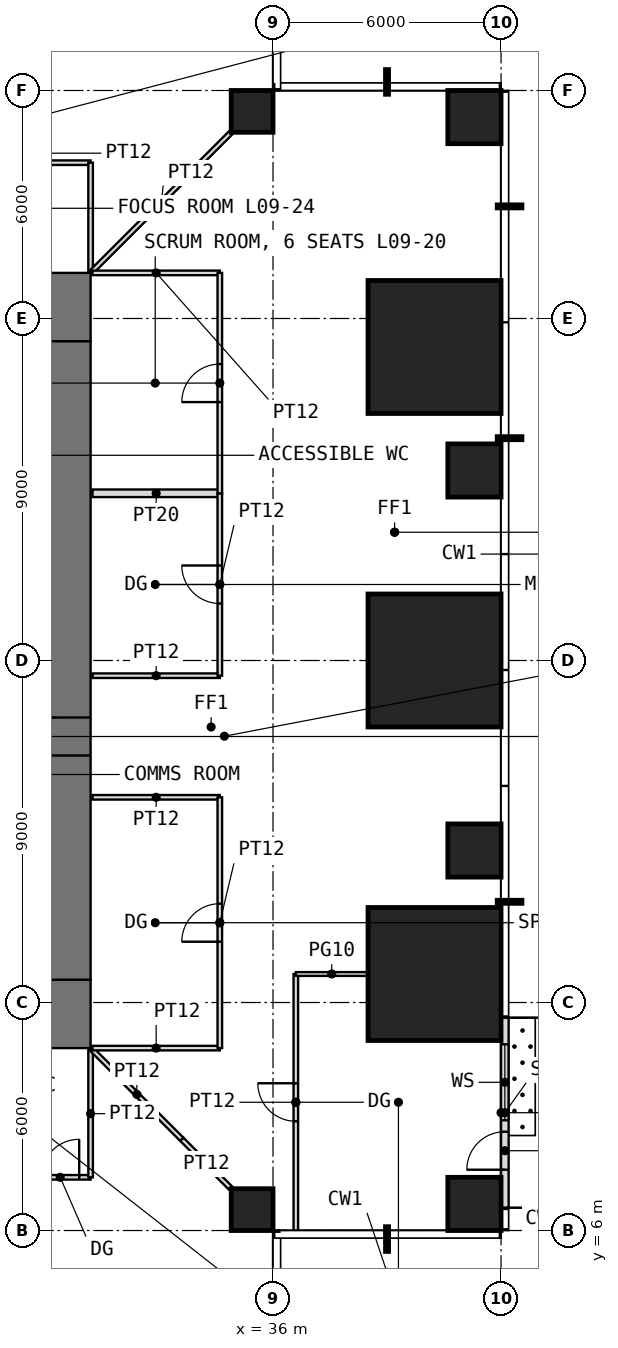
"""IFC4 building model, lengths in metres.
Left out: names, types, materials, properties, quantities, classifications, styles, units other than length and angle.
Written with IfcOpenShell. Run it as: python <this file> out.ifc"""

import sys

from ifc_helpers import new_model, si_unit, direction, frame, frame_2d, origin, origin_2d, place, context, subcontext, project, spatial, rectangle, extrude, element, fill, save


model = new_model("IFC4")
c1 = context("Model", 3, precision=1e-05, world=origin(), true_north=direction((0.0, 1.0)))
c2 = subcontext(c1, "Body", "Model", "MODEL_VIEW")
j1 = project(units=[si_unit("LENGTHUNIT", "METRE"), si_unit("PLANEANGLEUNIT", "RADIAN")], contexts=[c1])
p1 = place(None, origin())
s1 = spatial("IfcSite", under=j1, at=p1, CompositionType="ELEMENT")
p2 = place(p1, origin())
s2 = spatial("IfcBuilding", under=s1, at=p2, CompositionType="ELEMENT")
p3 = place(p2, frame((0.0, 0.0, 42.5)))
s3 = spatial("IfcBuildingStorey", under=s2, at=p3, CompositionType="ELEMENT", Elevation=42.5)
p4 = place(p3, frame((35.45, 6.55, 0.0), z_axis=(0.0, 0.0, 1.0), x_axis=(1.0, 0.0, 0.0)))
e1 = element("IfcColumn", 1, at=p4, inside=s3, PredefinedType="COLUMN", context=c2, shape_type="SweptSolid", body=[
    extrude(rectangle(XDim=1.1, YDim=1.1, at=origin_2d()), origin(), (0.0, 0.0, 1.0), 4.0),
])
p5 = place(p3, frame((41.3, 6.7, 0.0), z_axis=(0.0, 0.0, 1.0), x_axis=(1.0, 0.0, 0.0)))
e2 = element("IfcColumn", 2, at=p5, inside=s3, PredefinedType="COLUMN", context=c2, shape_type="SweptSolid", body=[
    extrude(rectangle(XDim=1.4, YDim=1.4, at=origin_2d()), origin(), (0.0, 0.0, 1.0), 4.0),
])
p6 = place(p3, frame((40.25, 12.75, 0.0), z_axis=(0.0, 0.0, 1.0), x_axis=(1.0, 0.0, 0.0)))
e3 = element("IfcColumn", 3, at=p6, inside=s3, PredefinedType="COLUMN", context=c2, shape_type="SweptSolid", body=[
    extrude(rectangle(XDim=3.5, YDim=3.5, at=origin_2d()), origin(), (0.0, 0.0, 1.0), 4.0),
])
p7 = place(p3, frame((41.3, 16.0, 0.0), z_axis=(0.0, 0.0, 1.0), x_axis=(1.0, 0.0, 0.0)))
e4 = element("IfcColumn", 4, at=p7, inside=s3, PredefinedType="COLUMN", context=c2, shape_type="SweptSolid", body=[
    extrude(rectangle(XDim=1.4, YDim=1.4, at=origin_2d()), origin(), (0.0, 0.0, 1.0), 4.0),
])
p8 = place(p3, frame((40.25, 21.0, 0.0), z_axis=(0.0, 0.0, 1.0), x_axis=(1.0, 0.0, 0.0)))
e5 = element("IfcColumn", 5, at=p8, inside=s3, PredefinedType="COLUMN", context=c2, shape_type="SweptSolid", body=[
    extrude(rectangle(XDim=3.5, YDim=3.5, at=origin_2d()), origin(), (0.0, 0.0, 1.0), 4.0),
])
p9 = place(p3, frame((41.3, 26.0, 0.0), z_axis=(0.0, 0.0, 1.0), x_axis=(1.0, 0.0, 0.0)))
e6 = element("IfcColumn", 6, at=p9, inside=s3, PredefinedType="COLUMN", context=c2, shape_type="SweptSolid", body=[
    extrude(rectangle(XDim=1.4, YDim=1.4, at=origin_2d()), origin(), (0.0, 0.0, 1.0), 4.0),
])
p10 = place(p3, frame((40.25, 29.25, 0.0), z_axis=(0.0, 0.0, 1.0), x_axis=(1.0, 0.0, 0.0)))
e7 = element("IfcColumn", 7, at=p10, inside=s3, PredefinedType="COLUMN", context=c2, shape_type="SweptSolid", body=[
    extrude(rectangle(XDim=3.5, YDim=3.5, at=origin_2d()), origin(), (0.0, 0.0, 1.0), 4.0),
])
p11 = place(p3, frame((35.45, 35.45, 0.0), z_axis=(0.0, 0.0, 1.0), x_axis=(1.0, 0.0, 0.0)))
e8 = element("IfcColumn", 8, at=p11, inside=s3, PredefinedType="COLUMN", context=c2, shape_type="SweptSolid", body=[
    extrude(rectangle(XDim=1.1, YDim=1.1, at=origin_2d()), origin(), (0.0, 0.0, 1.0), 4.0),
])
p12 = place(p3, frame((41.3, 35.3, 0.0), z_axis=(0.0, 0.0, 1.0), x_axis=(1.0, 0.0, 0.0)))
e9 = element("IfcColumn", 9, at=p12, inside=s3, PredefinedType="COLUMN", context=c2, shape_type="SweptSolid", body=[
    extrude(rectangle(XDim=1.4, YDim=1.4, at=origin_2d()), origin(), (0.0, 0.0, 1.0), 4.0),
])
p13 = place(p3, frame((42.1, 6.6, 0.0), z_axis=(0.0, 0.0, 1.0), x_axis=(0.0, 1.0, 0.0)))
e10 = element("IfcWall", 10, at=p13, inside=s3, PredefinedType="USERDEFINED", context=c2, shape_type="SweptSolid", body=[
    extrude(rectangle(XDim=5.0, YDim=0.2, at=frame_2d((2.5, 0.0))), origin(), (0.0, 0.0, 1.0), 3.75),
])
p14 = place(p13, frame((1.0, 0.0, 0.0)))
e11 = element("IfcOpeningElement", 11, at=p14, cuts=e10, PredefinedType="OPENING", context=c2, shape_type="SweptSolid", body=[
    extrude(rectangle(XDim=1.0, YDim=2.4, at=frame_2d((0.5, 1.2))), frame((0.0, 0.11, 0.0), z_axis=(0.0, -1.0, 0.0), x_axis=(1.0, 0.0, 0.0)), (0.0, 0.0, 1.0), 0.22),
])
p15 = place(p13, frame((2.3, 0.0, 0.3)))
e12 = element("IfcOpeningElement", 12, at=p15, cuts=e10, PredefinedType="OPENING", context=c2, shape_type="SweptSolid", body=[
    extrude(rectangle(XDim=2.0, YDim=2.7, at=frame_2d((1.0, 1.35))), frame((0.0, 0.11, 0.0), z_axis=(0.0, -1.0, 0.0), x_axis=(1.0, 0.0, 0.0)), (0.0, 0.0, 1.0), 0.22),
])
p16 = place(p3, frame((10.8, 11.7, -0.05), z_axis=(0.0, 0.0, 1.0), x_axis=(1.0, 0.0, 0.0)))
e13 = element("IfcWall", 13, at=p16, inside=s3, PredefinedType="SHEAR", context=c2, shape_type="SweptSolid", body=[
    extrude(rectangle(XDim=20.4, YDim=1.8, at=frame_2d((10.2, 0.0))), origin(), (0.0, 0.0, 1.0), 4.0),
])
p17 = place(p16, frame((9.2, 0.0, 0.05)))
e14 = element("IfcOpeningElement", 14, at=p17, cuts=e13, PredefinedType="OPENING", context=c2, shape_type="SweptSolid", body=[
    extrude(rectangle(XDim=2.0, YDim=2.2, at=frame_2d((1.0, 1.1))), frame((0.0, 0.91, 0.0), z_axis=(0.0, -1.0, 0.0), x_axis=(1.0, 0.0, 0.0)), (0.0, 0.0, 1.0), 1.82),
])
p18 = place(p3, frame((10.8, 30.3, -0.05), z_axis=(0.0, 0.0, 1.0), x_axis=(1.0, 0.0, 0.0)))
e15 = element("IfcWall", 15, at=p18, inside=s3, PredefinedType="SHEAR", context=c2, shape_type="SweptSolid", body=[
    extrude(rectangle(XDim=20.4, YDim=1.8, at=frame_2d((10.2, 0.0))), origin(), (0.0, 0.0, 1.0), 4.0),
])
p19 = place(p18, frame((9.2, 0.0, 0.05)))
e16 = element("IfcOpeningElement", 16, at=p19, cuts=e15, PredefinedType="OPENING", context=c2, shape_type="SweptSolid", body=[
    extrude(rectangle(XDim=2.0, YDim=2.2, at=frame_2d((1.0, 1.1))), frame((0.0, 0.91, 0.0), z_axis=(0.0, -1.0, 0.0), x_axis=(1.0, 0.0, 0.0)), (0.0, 0.0, 1.0), 1.82),
])
p20 = place(p3, frame((30.3, 12.6, -0.05), z_axis=(0.0, 0.0, 1.0), x_axis=(0.0, 1.0, 0.0)))
e17 = element("IfcWall", 17, at=p20, inside=s3, PredefinedType="SHEAR", context=c2, shape_type="SweptSolid", body=[
    extrude(rectangle(XDim=16.8, YDim=1.8, at=frame_2d((8.4, 0.0))), origin(), (0.0, 0.0, 1.0), 4.0),
])
p21 = place(p20, frame((5.9, 0.0, 0.05)))
e18 = element("IfcOpeningElement", 18, at=p21, cuts=e17, PredefinedType="OPENING", context=c2, shape_type="SweptSolid", body=[
    extrude(rectangle(XDim=1.0, YDim=2.2, at=frame_2d((0.5, 1.1))), frame((0.0, 0.91, 0.0), z_axis=(0.0, -1.0, 0.0), x_axis=(1.0, 0.0, 0.0)), (0.0, 0.0, 1.0), 1.82),
])
p22 = place(p3, frame((27.0, 34.1, 0.0), z_axis=(0.0, 0.0, 1.0), x_axis=(1.0, 0.0, 0.0)))
e19 = element("IfcWall", 19, at=p22, inside=s3, PredefinedType="PARTITIONING", context=c2, shape_type="SweptSolid", body=[
    extrude(rectangle(XDim=4.2, YDim=0.12, at=frame_2d((2.1, 0.0))), origin(), (0.0, 0.0, 1.0), 3.75),
])
p23 = place(p22, frame((1.6, 0.0, 0.0)))
e20 = element("IfcOpeningElement", 20, at=p23, cuts=e19, PredefinedType="OPENING", context=c2, shape_type="SweptSolid", body=[
    extrude(rectangle(XDim=1.0, YDim=2.2, at=frame_2d((0.5, 1.1))), frame((0.0, 0.07, 0.0), z_axis=(0.0, -1.0, 0.0), x_axis=(1.0, 0.0, 0.0)), (0.0, 0.0, 1.0), 0.14),
])
p24 = place(p3, frame((27.4, 7.4, 0.0), z_axis=(0.0, 0.0, 1.0), x_axis=(1.0, 0.0, 0.0)))
e21 = element("IfcWall", 21, at=p24, inside=s3, PredefinedType="PARTITIONING", context=c2, shape_type="SweptSolid", body=[
    extrude(rectangle(XDim=3.8, YDim=0.12, at=frame_2d((1.9, 0.0))), origin(), (0.0, 0.0, 1.0), 3.75),
])
p25 = place(p24, frame((2.5, 0.0, 0.0)))
e22 = element("IfcOpeningElement", 22, at=p25, cuts=e21, PredefinedType="OPENING", context=c2, shape_type="SweptSolid", body=[
    extrude(rectangle(XDim=1.0, YDim=2.4, at=frame_2d((0.5, 1.2))), frame((0.0, 0.07, 0.0), z_axis=(0.0, -1.0, 0.0), x_axis=(1.0, 0.0, 0.0)), (0.0, 0.0, 1.0), 0.14),
])
p26 = place(p3, frame((31.2, 7.4, 0.0), z_axis=(0.0, 0.0, 1.0), x_axis=(0.0, 1.0, 0.0)))
e23 = element("IfcWall", 23, at=p26, inside=s3, PredefinedType="PARTITIONING", context=c2, shape_type="SweptSolid", body=[
    extrude(rectangle(XDim=3.35, YDim=0.12, at=frame_2d((1.675, 0.0))), origin(), (0.0, 0.0, 1.0), 3.75),
])
p27 = place(p3, frame((31.2, 31.25, 0.0), z_axis=(0.0, 0.0, 1.0), x_axis=(0.0, 1.0, 0.0)))
e24 = element("IfcWall", 24, at=p27, inside=s3, PredefinedType="PARTITIONING", context=c2, shape_type="SweptSolid", body=[
    extrude(rectangle(XDim=2.85, YDim=0.12, at=frame_2d((1.425, 0.0))), origin(), (0.0, 0.0, 1.0), 3.75),
])
p28 = place(p3, frame((31.235, 10.765, 0.0), z_axis=(0.0, 0.0, 1.0), x_axis=(0.707106781187, -0.707106781187, 0.0)))
e25 = element("IfcWall", 25, at=p28, inside=s3, PredefinedType="PARTITIONING", context=c2, shape_type="SweptSolid", body=[
    extrude(rectangle(XDim=3.346, YDim=0.12, at=frame_2d((1.673, 0.0))), origin(), (0.0, 0.0, 1.0), 3.75),
])
p29 = place(p3, frame((31.235, 31.235, 0.0), z_axis=(0.0, 0.0, 1.0), x_axis=(0.707106781187, 0.707106781187, 0.0)))
e26 = element("IfcWall", 26, at=p29, inside=s3, PredefinedType="PARTITIONING", context=c2, shape_type="SweptSolid", body=[
    extrude(rectangle(XDim=5.168, YDim=0.12, at=frame_2d((2.584, 0.0))), origin(), (0.0, 0.0, 1.0), 3.75),
])
for number, where, z_axis, x_axis in (
    (27, (31.25, 10.8, 0.0), (0.0, 0.0, 1.0), (1.0, 0.0, 0.0)),
    (28, (31.25, 17.4, 0.0), (0.0, 0.0, 1.0), (1.0, 0.0, 0.0)),
    (29, (31.25, 20.6, 0.0), (0.0, 0.0, 1.0), (1.0, 0.0, 0.0)),
):
    element("IfcWall", number, at=place(p3, frame(where, z_axis=z_axis, x_axis=x_axis)), inside=s3, PredefinedType="PARTITIONING", context=c2, shape_type="SweptSolid", body=[
        extrude(rectangle(XDim=3.35, YDim=0.12, at=frame_2d((1.675, 0.0))), origin(), (0.0, 0.0, 1.0), 3.75),
    ])
p30 = place(p3, frame((31.25, 25.4, 0.0), z_axis=(0.0, 0.0, 1.0), x_axis=(1.0, 0.0, 0.0)))
e30 = element("IfcWall", 30, at=p30, inside=s3, PredefinedType="PARTITIONING", context=c2, shape_type="SweptSolid", body=[
    extrude(rectangle(XDim=3.35, YDim=0.2, at=frame_2d((1.675, 0.0))), origin(), (0.0, 0.0, 1.0), 3.75),
])
p31 = place(p3, frame((31.25, 31.2, 0.0), z_axis=(0.0, 0.0, 1.0), x_axis=(1.0, 0.0, 0.0)))
e31 = element("IfcWall", 31, at=p31, inside=s3, PredefinedType="PARTITIONING", context=c2, shape_type="SweptSolid", body=[
    extrude(rectangle(XDim=3.35, YDim=0.12, at=frame_2d((1.675, 0.0))), origin(), (0.0, 0.0, 1.0), 3.75),
])
p32 = place(p3, frame((33.602, 8.398, 0.0), z_axis=(0.0, 0.0, 1.0), x_axis=(0.707106781187, -0.707106781187, 0.0)))
e32 = element("IfcWall", 32, at=p32, inside=s3, PredefinedType="PARTITIONING", context=c2, shape_type="SweptSolid", body=[
    extrude(rectangle(XDim=1.822, YDim=0.12, at=frame_2d((0.911, 0.0))), origin(), (0.0, 0.0, 1.0), 3.75),
])
p33 = place(p3, frame((34.6, 10.8, 0.0), z_axis=(0.0, 0.0, 1.0), x_axis=(0.0, 1.0, 0.0)))
e33 = element("IfcWall", 33, at=p33, inside=s3, PredefinedType="PARTITIONING", context=c2, shape_type="SweptSolid", body=[
    extrude(rectangle(XDim=6.6, YDim=0.12, at=frame_2d((3.3, 0.0))), origin(), (0.0, 0.0, 1.0), 3.75),
])
p34 = place(p33, frame((2.8, 0.0, 0.0)))
e34 = element("IfcOpeningElement", 34, at=p34, cuts=e33, PredefinedType="OPENING", context=c2, shape_type="SweptSolid", body=[
    extrude(rectangle(XDim=1.0, YDim=2.4, at=frame_2d((0.5, 1.2))), frame((0.0, 0.07, 0.0), z_axis=(0.0, -1.0, 0.0), x_axis=(1.0, 0.0, 0.0)), (0.0, 0.0, 1.0), 0.14),
])
p35 = place(p3, frame((34.6, 20.6, 0.0), z_axis=(0.0, 0.0, 1.0), x_axis=(0.0, 1.0, 0.0)))
e35 = element("IfcWall", 35, at=p35, inside=s3, PredefinedType="PARTITIONING", context=c2, shape_type="SweptSolid", body=[
    extrude(rectangle(XDim=4.8, YDim=0.12, at=frame_2d((2.4, 0.0))), origin(), (0.0, 0.0, 1.0), 3.75),
])
p36 = place(p35, frame((1.9, 0.0, 0.0)))
e36 = element("IfcOpeningElement", 36, at=p36, cuts=e35, PredefinedType="OPENING", context=c2, shape_type="SweptSolid", body=[
    extrude(rectangle(XDim=1.0, YDim=2.4, at=frame_2d((0.5, 1.2))), frame((0.0, 0.07, 0.0), z_axis=(0.0, -1.0, 0.0), x_axis=(1.0, 0.0, 0.0)), (0.0, 0.0, 1.0), 0.14),
])
p37 = place(p3, frame((34.6, 25.4, 0.0), z_axis=(0.0, 0.0, 1.0), x_axis=(0.0, 1.0, 0.0)))
e37 = element("IfcWall", 37, at=p37, inside=s3, PredefinedType="PARTITIONING", context=c2, shape_type="SweptSolid", body=[
    extrude(rectangle(XDim=5.8, YDim=0.12, at=frame_2d((2.9, 0.0))), origin(), (0.0, 0.0, 1.0), 3.75),
])
p38 = place(p37, frame((2.4, 0.0, 0.0)))
e38 = element("IfcOpeningElement", 38, at=p38, cuts=e37, PredefinedType="OPENING", context=c2, shape_type="SweptSolid", body=[
    extrude(rectangle(XDim=1.0, YDim=2.4, at=frame_2d((0.5, 1.2))), frame((0.0, 0.07, 0.0), z_axis=(0.0, -1.0, 0.0), x_axis=(1.0, 0.0, 0.0)), (0.0, 0.0, 1.0), 0.14),
])
p39 = place(p3, frame((36.6, 6.0, 0.0), z_axis=(0.0, 0.0, 1.0), x_axis=(0.0, 1.0, 0.0)))
e39 = element("IfcWall", 39, at=p39, inside=s3, PredefinedType="PARTITIONING", context=c2, shape_type="SweptSolid", body=[
    extrude(rectangle(XDim=6.75, YDim=0.12, at=frame_2d((3.375, 0.0))), origin(), (0.0, 0.0, 1.0), 3.75),
])
p40 = place(p39, frame((2.875, 0.0, 0.0)))
e40 = element("IfcOpeningElement", 40, at=p40, cuts=e39, PredefinedType="OPENING", context=c2, shape_type="SweptSolid", body=[
    extrude(rectangle(XDim=1.0, YDim=2.4, at=frame_2d((0.5, 1.2))), frame((0.0, 0.07, 0.0), z_axis=(0.0, -1.0, 0.0), x_axis=(1.0, 0.0, 0.0)), (0.0, 0.0, 1.0), 0.14),
])
p41 = place(p3, frame((36.6, 12.75, 0.0), z_axis=(0.0, 0.0, 1.0), x_axis=(1.0, 0.0, 0.0)))
e41 = element("IfcWall", 41, at=p41, inside=s3, PredefinedType="PARTITIONING", context=c2, shape_type="SweptSolid", body=[
    extrude(rectangle(XDim=1.89, YDim=0.1, at=frame_2d((0.945, 0.0))), origin(), (0.0, 0.0, 1.0), 3.75),
])
p42 = place(p14, origin())
e42 = element("IfcDoor", 42, at=p42, inside=s3, OperationType="SINGLE_SWING_LEFT", PredefinedType="DOOR", context=c2, shape_type="SweptSolid", body=[
    extrude(rectangle(XDim=1.0, YDim=2.4, at=frame_2d((0.5, 1.2))), frame((0.0, 0.025, 0.0), z_axis=(0.0, -1.0, 0.0), x_axis=(1.0, 0.0, 0.0)), (0.0, 0.0, 1.0), 0.05),
])
fill(e11, e42)
p43 = place(p15, origin())
e43 = element("IfcWindow", 43, at=p43, inside=s3, PartitioningType="SINGLE_PANEL", PredefinedType="WINDOW", context=c2, shape_type="SweptSolid", body=[
    extrude(rectangle(XDim=2.0, YDim=2.7, at=frame_2d((1.0, 1.35))), frame((0.0, 0.03, 0.0), z_axis=(0.0, -1.0, 0.0), x_axis=(1.0, 0.0, 0.0)), (0.0, 0.0, 1.0), 0.06),
])
fill(e12, e43)
p44 = place(p21, origin())
e44 = element("IfcDoor", 44, at=p44, inside=s3, OperationType="SINGLE_SWING_RIGHT", PredefinedType="DOOR", context=c2, shape_type="SweptSolid", body=[
    extrude(rectangle(XDim=1.0, YDim=2.2, at=frame_2d((0.5, 1.1))), frame((0.0, 0.025, 0.0), z_axis=(0.0, -1.0, 0.0), x_axis=(1.0, 0.0, 0.0)), (0.0, 0.0, 1.0), 0.05),
])
fill(e18, e44)
p45 = place(p34, origin())
e45 = element("IfcDoor", 45, at=p45, inside=s3, OperationType="SINGLE_SWING_LEFT", PredefinedType="DOOR", context=c2, shape_type="SweptSolid", body=[
    extrude(rectangle(XDim=1.0, YDim=2.4, at=frame_2d((0.5, 1.2))), frame((0.0, 0.025, 0.0), z_axis=(0.0, -1.0, 0.0), x_axis=(1.0, 0.0, 0.0)), (0.0, 0.0, 1.0), 0.05),
])
fill(e34, e45)
p46 = place(p36, origin())
e46 = element("IfcDoor", 46, at=p46, inside=s3, OperationType="SINGLE_SWING_RIGHT", PredefinedType="DOOR", context=c2, shape_type="SweptSolid", body=[
    extrude(rectangle(XDim=1.0, YDim=2.4, at=frame_2d((0.5, 1.2))), frame((0.0, 0.025, 0.0), z_axis=(0.0, -1.0, 0.0), x_axis=(1.0, 0.0, 0.0)), (0.0, 0.0, 1.0), 0.05),
])
fill(e36, e46)
p47 = place(p38, origin())
e47 = element("IfcDoor", 47, at=p47, inside=s3, OperationType="SINGLE_SWING_LEFT", PredefinedType="DOOR", context=c2, shape_type="SweptSolid", body=[
    extrude(rectangle(XDim=1.0, YDim=2.4, at=frame_2d((0.5, 1.2))), frame((0.0, 0.025, 0.0), z_axis=(0.0, -1.0, 0.0), x_axis=(1.0, 0.0, 0.0)), (0.0, 0.0, 1.0), 0.05),
])
fill(e38, e47)
p48 = place(p40, origin())
e48 = element("IfcDoor", 48, at=p48, inside=s3, OperationType="SINGLE_SWING_RIGHT", PredefinedType="DOOR", context=c2, shape_type="SweptSolid", body=[
    extrude(rectangle(XDim=1.0, YDim=2.4, at=frame_2d((0.5, 1.2))), frame((0.0, 0.025, 0.0), z_axis=(0.0, -1.0, 0.0), x_axis=(1.0, 0.0, 0.0)), (0.0, 0.0, 1.0), 0.05),
])
fill(e40, e48)
p49 = place(p25, origin())
e49 = element("IfcDoor", 49, at=p49, inside=s3, OperationType="SINGLE_SWING_RIGHT", PredefinedType="DOOR", context=c2, shape_type="SweptSolid", body=[
    extrude(rectangle(XDim=1.0, YDim=2.4, at=frame_2d((0.5, 1.2))), frame((0.0, 0.025, 0.0), z_axis=(0.0, -1.0, 0.0), x_axis=(1.0, 0.0, 0.0)), (0.0, 0.0, 1.0), 0.05),
])
fill(e22, e49)
save(model, sys.argv[1])
